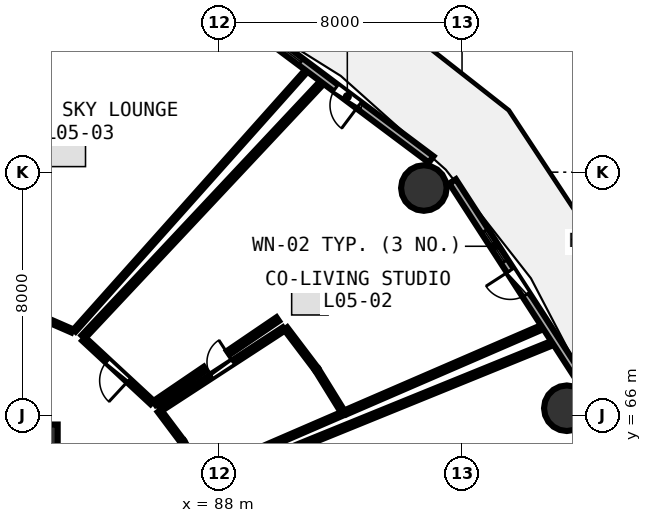
"""IFC4 building model, lengths in metres.
Left out: names, types, materials, properties, quantities, classifications, styles, units other than length and angle.
Written with IfcOpenShell. Run it as: python <this file> out.ifc"""

import sys

from ifc_helpers import new_model, si_unit, direction, frame, frame_2d, origin, origin_2d, place, context, subcontext, project, spatial, rectangle, circle, extrude, element, fill, save


model = new_model("IFC4")
c1 = context("Model", 3, precision=1e-05, world=origin(), true_north=direction((0.0, 1.0)))
c2 = subcontext(c1, "Body", "Model", "MODEL_VIEW")
j1 = project(units=[si_unit("LENGTHUNIT", "METRE"), si_unit("PLANEANGLEUNIT", "RADIAN")], contexts=[c1])
p1 = place(None, origin())
s1 = spatial("IfcSite", under=j1, at=p1, CompositionType="ELEMENT")
p2 = place(p1, origin())
s2 = spatial("IfcBuilding", under=s1, at=p2, CompositionType="ELEMENT")
p3 = place(p2, frame((0.0, 0.0, 22.5)))
s3 = spatial("IfcBuildingStorey", under=s2, at=p3, CompositionType="ELEMENT", Elevation=22.5)
p4 = place(p3, frame((82.0, 65.0, 0.0), z_axis=(0.0, 0.0, 1.0), x_axis=(1.0, 0.0, 0.0)))
e1 = element("IfcColumn", 1, at=p4, inside=s3, PredefinedType="PILASTER", context=c2, shape_type="SweptSolid", body=[
    extrude(rectangle(XDim=1.4, YDim=1.4, at=origin_2d()), origin(), (0.0, 0.0, 1.0), 3.75),
])
for number, where, z_axis, x_axis in (
    (2, (99.447, 66.236, 0.0), (0.0, 0.0, 1.0), (1.0, 0.0, 0.0)),
    (3, (94.744, 73.478, 0.0), (0.0, 0.0, 1.0), (1.0, 0.0, 0.0)),
):
    element("IfcColumn", number, at=place(p3, frame(where, z_axis=z_axis, x_axis=x_axis)), inside=s3, PredefinedType="COLUMN", context=c2, shape_type="SweptSolid", body=[
        extrude(circle(Radius=0.75, at=origin_2d()), origin(), (0.0, 0.0, 1.0), 3.75),
    ])
p5 = place(p3, frame((99.999, 67.033, 0.0), z_axis=(0.0, 0.0, 1.0), x_axis=(-0.543005114258, 0.839729388488, 0.0)))
e4 = element("IfcWall", 4, at=p5, inside=s3, PredefinedType="SOLIDWALL", context=c2, shape_type="SweptSolid", body=[
    extrude(rectangle(XDim=7.938, YDim=0.26, at=frame_2d((3.969, 0.0))), origin(), (0.0, 0.0, 1.0), 3.475),
])
p6 = place(p5, frame((3.494, 0.0, 0.0)))
e5 = element("IfcOpeningElement", 5, at=p6, cuts=e4, PredefinedType="OPENING", context=c2, shape_type="SweptSolid", body=[
    extrude(rectangle(XDim=0.95, YDim=2.1, at=frame_2d((0.475, 1.05))), frame((0.0, 0.14, 0.0), z_axis=(0.0, -1.0, 0.0), x_axis=(1.0, 0.0, 0.0)), (0.0, 0.0, 1.0), 0.28),
])
p7 = place(p5, frame((4.794, 0.0, 0.85)))
e6 = element("IfcOpeningElement", 6, at=p7, cuts=e4, PredefinedType="OPENING", context=c2, shape_type="SweptSolid", body=[
    extrude(rectangle(XDim=1.2, YDim=1.45, at=frame_2d((0.6, 0.725))), frame((0.0, 0.14, 0.0), z_axis=(0.0, -1.0, 0.0), x_axis=(1.0, 0.0, 0.0)), (0.0, 0.0, 1.0), 0.28),
])
p8 = place(p3, frame((94.984, 74.418, 0.0), z_axis=(0.0, 0.0, 1.0), x_axis=(-0.80030733173, 0.599590005569, 0.0)))
e7 = element("IfcWall", 7, at=p8, inside=s3, PredefinedType="SOLIDWALL", context=c2, shape_type="SweptSolid", body=[
    extrude(rectangle(XDim=8.291, YDim=0.26, at=frame_2d((4.145, 0.0))), origin(), (0.0, 0.0, 1.0), 3.475),
])
p9 = place(p8, frame((2.97, 0.0, 0.0)))
e8 = element("IfcOpeningElement", 8, at=p9, cuts=e7, PredefinedType="OPENING", context=c2, shape_type="SweptSolid", body=[
    extrude(rectangle(XDim=0.95, YDim=2.1, at=frame_2d((0.475, 1.05))), frame((0.0, 0.14, 0.0), z_axis=(0.0, -1.0, 0.0), x_axis=(1.0, 0.0, 0.0)), (0.0, 0.0, 1.0), 0.28),
])
p10 = place(p8, frame((5.35, 0.0, 0.85)))
e9 = element("IfcOpeningElement", 9, at=p10, cuts=e7, PredefinedType="OPENING", context=c2, shape_type="SweptSolid", body=[
    extrude(rectangle(XDim=1.2, YDim=1.45, at=frame_2d((0.6, 0.725))), frame((0.0, 0.14, 0.0), z_axis=(0.0, -1.0, 0.0), x_axis=(1.0, 0.0, 0.0)), (0.0, 0.0, 1.0), 0.28),
])
p11 = place(p3, frame((86.083, 66.2, 0.0), z_axis=(0.0, 0.0, 1.0), x_axis=(0.837796261941, 0.545982988267, 0.0)))
e10 = element("IfcWall", 10, at=p11, inside=s3, PredefinedType="PLUMBINGWALL", context=c2, shape_type="SweptSolid", body=[
    extrude(rectangle(XDim=4.838, YDim=0.13, at=frame_2d((2.419, 0.0))), origin(), (0.0, 0.0, 1.0), 3.235),
])
p12 = place(p11, frame((1.989, 0.0, 0.0)))
e11 = element("IfcOpeningElement", 11, at=p12, cuts=e10, PredefinedType="OPENING", context=c2, shape_type="SweptSolid", body=[
    extrude(rectangle(XDim=0.86, YDim=2.05, at=frame_2d((0.43, 1.025))), frame((0.0, 0.075, 0.0), z_axis=(0.0, -1.0, 0.0), x_axis=(1.0, 0.0, 0.0)), (0.0, 0.0, 1.0), 0.15),
])
p13 = place(p3, frame((85.806, 66.425, 0.0), z_axis=(0.0, 0.0, 1.0), x_axis=(-0.7329267348, 0.680307578538, 0.0)))
e12 = element("IfcWall", 12, at=p13, inside=s3, PredefinedType="PARTITIONING", context=c2, shape_type="SweptSolid", body=[
    extrude(rectangle(XDim=3.067, YDim=0.15, at=frame_2d((1.533, 0.0))), origin(), (0.0, 0.0, 1.0), 2.875),
])
p14 = place(p13, frame((1.059, 0.0, 0.0)))
e13 = element("IfcOpeningElement", 13, at=p14, cuts=e12, PredefinedType="OPENING", context=c2, shape_type="SweptSolid", body=[
    extrude(rectangle(XDim=0.95, YDim=2.08, at=frame_2d((0.475, 1.04))), frame((0.0, 0.085, 0.0), z_axis=(0.0, -1.0, 0.0), x_axis=(1.0, 0.0, 0.0)), (0.0, 0.0, 1.0), 0.17),
])
p15 = place(p3, frame((83.172, 68.783, 0.0), z_axis=(0.0, 0.0, 1.0), x_axis=(-0.916419655578, 0.400218708797, 0.0)))
e14 = element("IfcWall", 14, at=p15, inside=s3, PredefinedType="PARTITIONING", context=c2, shape_type="SweptSolid", body=[
    extrude(rectangle(XDim=6.104, YDim=0.12, at=frame_2d((3.052, 0.0))), origin(), (0.0, 0.0, 1.0), 2.875),
])
p16 = place(p15, frame((2.602, 0.0, 0.0)))
e15 = element("IfcOpeningElement", 15, at=p16, cuts=e14, PredefinedType="OPENING", context=c2, shape_type="SweptSolid", body=[
    extrude(rectangle(XDim=0.9, YDim=2.08, at=frame_2d((0.45, 1.04))), frame((0.0, 0.07, 0.0), z_axis=(0.0, -1.0, 0.0), x_axis=(1.0, 0.0, 0.0)), (0.0, 0.0, 1.0), 0.14),
])
p17 = place(p3, frame((87.657, 63.778, 0.0), z_axis=(0.0, 0.0, 1.0), x_axis=(0.926333713065, 0.376703931542, 0.0)))
e16 = element("IfcWall", 16, at=p17, inside=s3, PredefinedType="PARTITIONING", context=c2, shape_type="SweptSolid", body=[
    extrude(rectangle(XDim=12.099, YDim=0.15, at=frame_2d((6.05, 0.0))), origin(), (0.0, 0.0, 1.0), 2.875),
])
p18 = place(p3, frame((87.451, 64.08, 0.0), z_axis=(0.0, 0.0, 1.0), x_axis=(-0.52146609248, 0.853272004928, 0.0)))
e17 = element("IfcWall", 17, at=p18, inside=s3, PredefinedType="PLUMBINGWALL", context=c2, shape_type="SweptSolid", body=[
    extrude(rectangle(XDim=1.228, YDim=0.13, at=frame_2d((0.614, 0.0))), origin(), (0.0, 0.0, 1.0), 3.48),
])
p19 = place(p3, frame((86.788, 65.161, 0.0), z_axis=(0.0, 0.0, 1.0), x_axis=(-0.600347056143, 0.79973959023, 0.0)))
e18 = element("IfcWall", 18, at=p19, inside=s3, PredefinedType="PLUMBINGWALL", context=c2, shape_type="SweptSolid", body=[
    extrude(rectangle(XDim=1.238, YDim=0.13, at=frame_2d((0.619, 0.0))), origin(), (0.0, 0.0, 1.0), 2.875),
])
p20 = place(p3, frame((90.199, 68.858, 0.0), z_axis=(0.0, 0.0, 1.0), x_axis=(0.60376191721, -0.797164692725, 0.0)))
e19 = element("IfcWall", 19, at=p20, inside=s3, PredefinedType="PLUMBINGWALL", context=c2, shape_type="SweptSolid", body=[
    extrude(rectangle(XDim=1.669, YDim=0.13, at=frame_2d((0.834, 0.0))), origin(), (0.0, 0.0, 1.0), 3.175),
])
p21 = place(p3, frame((91.229, 67.495, 0.0), z_axis=(0.0, 0.0, 1.0), x_axis=(0.525540089642, -0.850768837099, 0.0)))
e20 = element("IfcWall", 20, at=p21, inside=s3, PredefinedType="PLUMBINGWALL", context=c2, shape_type="SweptSolid", body=[
    extrude(rectangle(XDim=1.651, YDim=0.13, at=frame_2d((0.826, 0.0))), origin(), (0.0, 0.0, 1.0), 3.175),
])
p22 = place(p3, frame((92.09, 66.065, 0.0), z_axis=(0.0, 0.0, 1.0), x_axis=(-0.917797204715, -0.397049481826, 0.0)))
e21 = element("IfcWall", 21, at=p22, inside=s3, PredefinedType="PLUMBINGWALL", context=c2, shape_type="SweptSolid", body=[
    extrude(rectangle(XDim=5.023, YDim=0.13, at=frame_2d((2.511, 0.0))), origin(), (0.0, 0.0, 1.0), 2.875),
])
p23 = place(p3, frame((83.542, 68.581, 0.0), z_axis=(0.0, 0.0, 1.0), x_axis=(0.684261294523, 0.729236916796, 0.0)))
e22 = element("IfcWall", 22, at=p23, inside=s3, PredefinedType="PARTITIONING", context=c2, shape_type="SweptSolid", body=[
    extrude(rectangle(XDim=11.438, YDim=0.15, at=frame_2d((5.719, 0.0))), origin(), (0.0, 0.0, 1.0), 2.875),
])
p24 = place(p3, frame((98.574, 68.874, 0.0), z_axis=(0.0, 0.0, 1.0), x_axis=(-0.917736225937, -0.397190407239, 0.0)))
e23 = element("IfcWall", 23, at=p24, inside=s3, PredefinedType="PARTITIONING", context=c2, shape_type="SweptSolid", body=[
    extrude(rectangle(XDim=6.967, YDim=0.15, at=frame_2d((3.483, 0.0))), origin(), (0.0, 0.0, 1.0), 2.875),
])
p25 = place(p3, frame((89.939, 69.166, 0.0), z_axis=(0.0, 0.0, 1.0), x_axis=(-0.826811291248, -0.562479411769, 0.0)))
e24 = element("IfcWall", 24, at=p25, inside=s3, PredefinedType="PARTITIONING", context=c2, shape_type="SweptSolid", body=[
    extrude(rectangle(XDim=1.971, YDim=0.15, at=frame_2d((0.985, 0.0))), origin(), (0.0, 0.0, 1.0), 3.48),
])
p26 = place(p3, frame((87.549, 67.539, 0.0), z_axis=(0.0, 0.0, 1.0), x_axis=(-0.826867883695, -0.562396215237, 0.0)))
e25 = element("IfcWall", 25, at=p26, inside=s3, PredefinedType="PARTITIONING", context=c2, shape_type="SweptSolid", body=[
    extrude(rectangle(XDim=2.014, YDim=0.15, at=frame_2d((1.007, 0.0))), origin(), (0.0, 0.0, 1.0), 3.235),
])
p27 = place(p3, frame((90.844, 77.294, 0.0), z_axis=(0.0, 0.0, 1.0), x_axis=(-0.66580890104, -0.746122313897, 0.0)))
e26 = element("IfcWall", 26, at=p27, inside=s3, PredefinedType="PARTITIONING", context=c2, shape_type="SweptSolid", body=[
    extrude(rectangle(XDim=11.399, YDim=0.1, at=frame_2d((5.7, 0.0))), origin(), (0.0, 0.0, 1.0), 2.875),
])
p28 = place(p6, frame((0.95, 0.0, 0.0), z_axis=(0.0, 0.0, 1.0), x_axis=(-1.0, 0.0, 0.0)))
e27 = element("IfcDoor", 27, at=p28, inside=s3, OperationType="SINGLE_SWING_LEFT", PredefinedType="DOOR", context=c2, shape_type="SweptSolid", body=[
    extrude(rectangle(XDim=0.95, YDim=2.1, at=frame_2d((0.475, 1.05))), frame((0.0, 0.025, 0.0), z_axis=(0.0, -1.0, 0.0), x_axis=(1.0, 0.0, 0.0)), (0.0, 0.0, 1.0), 0.05),
])
fill(e5, e27)
p29 = place(p7, origin())
e28 = element("IfcWindow", 28, at=p29, inside=s3, PartitioningType="SINGLE_PANEL", PredefinedType="WINDOW", context=c2, shape_type="SweptSolid", body=[
    extrude(rectangle(XDim=1.2, YDim=1.45, at=frame_2d((0.6, 0.725))), frame((0.0, 0.03, 0.0), z_axis=(0.0, -1.0, 0.0), x_axis=(1.0, 0.0, 0.0)), (0.0, 0.0, 1.0), 0.06),
])
fill(e6, e28)
p30 = place(p9, frame((0.95, 0.0, 0.0), z_axis=(0.0, 0.0, 1.0), x_axis=(-1.0, 0.0, 0.0)))
e29 = element("IfcDoor", 29, at=p30, inside=s3, OperationType="SINGLE_SWING_RIGHT", PredefinedType="DOOR", context=c2, shape_type="SweptSolid", body=[
    extrude(rectangle(XDim=0.95, YDim=2.1, at=frame_2d((0.475, 1.05))), frame((0.0, 0.025, 0.0), z_axis=(0.0, -1.0, 0.0), x_axis=(1.0, 0.0, 0.0)), (0.0, 0.0, 1.0), 0.05),
])
fill(e8, e29)
p31 = place(p10, origin())
e30 = element("IfcWindow", 30, at=p31, inside=s3, PartitioningType="SINGLE_PANEL", PredefinedType="WINDOW", context=c2, shape_type="SweptSolid", body=[
    extrude(rectangle(XDim=1.2, YDim=1.45, at=frame_2d((0.6, 0.725))), frame((0.0, 0.03, 0.0), z_axis=(0.0, -1.0, 0.0), x_axis=(1.0, 0.0, 0.0)), (0.0, 0.0, 1.0), 0.06),
])
fill(e9, e30)
p32 = place(p12, origin())
e31 = element("IfcDoor", 31, at=p32, inside=s3, OperationType="SINGLE_SWING_RIGHT", PredefinedType="DOOR", context=c2, shape_type="SweptSolid", body=[
    extrude(rectangle(XDim=0.86, YDim=2.05, at=frame_2d((0.43, 1.025))), frame((0.0, 0.025, 0.0), z_axis=(0.0, -1.0, 0.0), x_axis=(1.0, 0.0, 0.0)), (0.0, 0.0, 1.0), 0.05),
])
fill(e11, e31)
p33 = place(p14, origin())
e32 = element("IfcDoor", 32, at=p33, inside=s3, OperationType="SINGLE_SWING_LEFT", PredefinedType="DOOR", context=c2, shape_type="SweptSolid", body=[
    extrude(rectangle(XDim=0.95, YDim=2.08, at=frame_2d((0.475, 1.04))), frame((0.0, 0.025, 0.0), z_axis=(0.0, -1.0, 0.0), x_axis=(1.0, 0.0, 0.0)), (0.0, 0.0, 1.0), 0.05),
])
fill(e13, e32)
save(model, sys.argv[1])
